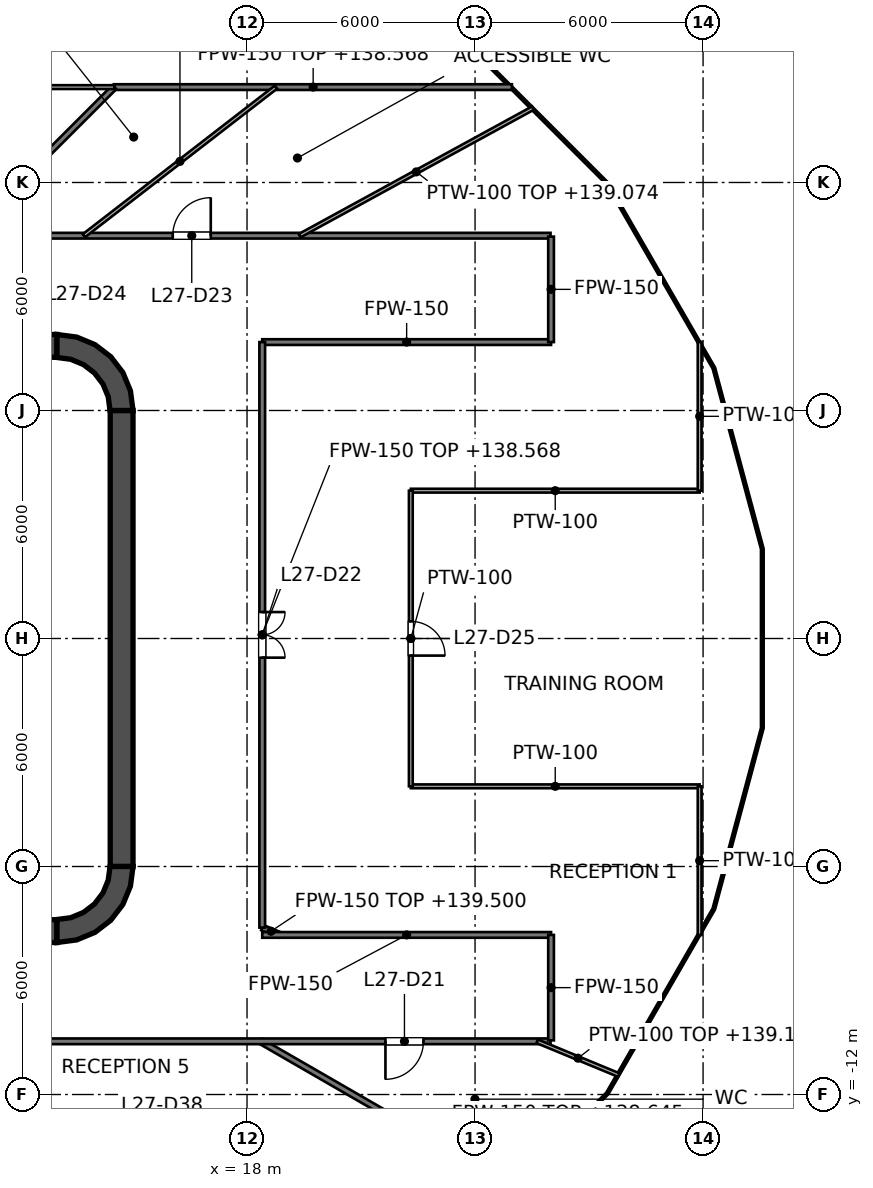
"""IFC4 building model, lengths in metres.
Left out: names, types, materials, properties, quantities, classifications, styles, units other than length and angle.
Written with IfcOpenShell. Run it as: python <this file> out.ifc"""

import sys

from ifc_helpers import new_model, si_unit, direction, frame, frame_2d, origin, place, context, subcontext, project, spatial, polyline, rectangle, outline, extrude, element, fill, save


model = new_model("IFC4")
c1 = context("Model", 3, precision=1e-05, world=origin(), true_north=direction((0.0, 1.0)))
c2 = subcontext(c1, "Body", "Model", "MODEL_VIEW")
j1 = project(units=[si_unit("LENGTHUNIT", "METRE"), si_unit("PLANEANGLEUNIT", "RADIAN")], contexts=[c1])
p1 = place(None, origin())
s1 = spatial("IfcSite", under=j1, at=p1, CompositionType="ELEMENT")
p2 = place(p1, origin())
s2 = spatial("IfcBuilding", under=s1, at=p2, CompositionType="ELEMENT")
p3 = place(p2, frame((0.0, 0.0, 135.6)))
s3 = spatial("IfcBuildingStorey", under=s2, at=p3, CompositionType="ELEMENT", Elevation=135.6)
p4 = place(p3, frame((-13.0, 7.7, 0.0), z_axis=(0.0, 0.0, 1.0), x_axis=(1.0, 0.0, 0.0)))
e1 = element("IfcWall", 1, at=p4, inside=s3, PredefinedType="SHEAR", context=c2, shape_type="SweptSolid", body=[
    extrude(rectangle(XDim=26.0, YDim=0.6, at=frame_2d((13.0, 0.0))), origin(), (0.0, 0.0, 1.0), 4.2),
])
p5 = place(p4, frame((1.7, 0.0, 0.0)))
e2 = element("IfcOpeningElement", 2, at=p5, cuts=e1, PredefinedType="OPENING", context=c2, shape_type="SweptSolid", body=[
    extrude(rectangle(XDim=1.8, YDim=2.1, at=frame_2d((0.9, 1.05))), frame((0.0, 0.3, 0.0), z_axis=(0.0, -1.0, 0.0), x_axis=(1.0, 0.0, 0.0)), (0.0, 0.0, 1.0), 0.6),
])
p6 = place(p4, frame((22.5, 0.0, 0.0)))
e3 = element("IfcOpeningElement", 3, at=p6, cuts=e1, PredefinedType="OPENING", context=c2, shape_type="SweptSolid", body=[
    extrude(rectangle(XDim=1.8, YDim=2.1, at=frame_2d((0.9, 1.05))), frame((0.0, 0.3, 0.0), z_axis=(0.0, -1.0, 0.0), x_axis=(1.0, 0.0, 0.0)), (0.0, 0.0, 1.0), 0.6),
])
p7 = place(p3, frame((-13.0, -7.7, 0.0), z_axis=(0.0, 0.0, 1.0), x_axis=(1.0, 0.0, 0.0)))
e4 = element("IfcWall", 4, at=p7, inside=s3, PredefinedType="SHEAR", context=c2, shape_type="SweptSolid", body=[
    extrude(rectangle(XDim=26.0, YDim=0.6, at=frame_2d((13.0, 0.0))), origin(), (0.0, 0.0, 1.0), 4.2),
])
p8 = place(p7, frame((1.7, 0.0, 0.0)))
e5 = element("IfcOpeningElement", 5, at=p8, cuts=e4, PredefinedType="OPENING", context=c2, shape_type="SweptSolid", body=[
    extrude(rectangle(XDim=1.8, YDim=2.1, at=frame_2d((0.9, 1.05))), frame((0.0, 0.3, 0.0), z_axis=(0.0, -1.0, 0.0), x_axis=(1.0, 0.0, 0.0)), (0.0, 0.0, 1.0), 0.6),
])
p9 = place(p7, frame((22.5, 0.0, 0.0)))
e6 = element("IfcOpeningElement", 6, at=p9, cuts=e4, PredefinedType="OPENING", context=c2, shape_type="SweptSolid", body=[
    extrude(rectangle(XDim=1.8, YDim=2.1, at=frame_2d((0.9, 1.05))), frame((0.0, 0.3, 0.0), z_axis=(0.0, -1.0, 0.0), x_axis=(1.0, 0.0, 0.0)), (0.0, 0.0, 1.0), 0.6),
])
p10 = place(p3, frame((14.7, -6.0, 0.0), z_axis=(0.0, 0.0, 1.0), x_axis=(0.0, 1.0, 0.0)))
e7 = element("IfcWall", 7, at=p10, inside=s3, PredefinedType="SHEAR", context=c2, shape_type="SweptSolid", body=[
    extrude(rectangle(XDim=12.0, YDim=0.6, at=frame_2d((6.0, 0.0))), origin(), (0.0, 0.0, 1.0), 4.2),
])
p11 = place(p3, origin())
e8 = element("IfcWall", 8, at=p11, inside=s3, PredefinedType="SHEAR", context=c2, shape_type="SweptSolid", body=[
    extrude(outline(polyline([(13.0, 8.0), (13.0, 7.395), (13.361, 7.347), (13.698, 7.208), (13.986, 6.986), (14.208, 6.698), (14.347, 6.361), (14.395, 6.0), (15.0, 6.0), (14.932, 6.518), (14.732, 7.0), (14.414, 7.414), (14.0, 7.732), (13.518, 7.932), (13.0, 8.0)])), origin(), (0.0, 0.0, 1.0), 4.2),
])
e9 = element("IfcWall", 9, at=p11, inside=s3, PredefinedType="SHEAR", context=c2, shape_type="SweptSolid", body=[
    extrude(outline(polyline([(15.0, -6.0), (14.395, -6.0), (14.347, -6.361), (14.208, -6.698), (13.986, -6.986), (13.698, -7.208), (13.361, -7.347), (13.0, -7.395), (13.0, -8.0), (13.518, -7.932), (14.0, -7.732), (14.414, -7.414), (14.732, -7.0), (14.932, -6.518), (15.0, -6.0)])), origin(), (0.0, 0.0, 1.0), 4.2),
])
e10 = element("IfcWall", 10, at=p11, inside=s3, PredefinedType="SOLIDWALL", context=c2, shape_type="SweptSolid", body=[
    extrude(outline(polyline([(12.0, -5.675), (12.0, -5.925), (14.15, -5.925), (14.4, -5.925), (14.4, -5.675), (14.4, -3.025), (14.4, -2.775), (14.4, -0.125), (14.4, 0.125), (14.4, 2.775), (14.4, 3.025), (14.4, 5.675), (14.4, 5.925), (14.15, 5.925), (12.0, 5.925), (12.0, 5.675), (14.15, 5.675), (14.15, 3.025), (12.0, 3.025), (12.0, 2.775), (14.15, 2.775), (14.15, 0.125), (12.0, 0.125), (12.0, -0.125), (14.15, -0.125), (14.15, -2.775), (12.0, -2.775), (12.0, -3.025), (14.15, -3.025), (14.15, -5.675), (12.0, -5.675)])), origin(), (0.0, 0.0, 1.0), 4.05),
])
p12 = place(p3, frame((18.359, -10.6, 0.0), z_axis=(0.0, 0.0, 1.0), x_axis=(0.866036201792, -0.499981296836, 0.0)))
e11 = element("IfcWall", 11, at=p12, inside=s3, PredefinedType="PARTITIONING", context=c2, shape_type="SweptSolid", body=[
    extrude(rectangle(XDim=7.702, YDim=0.15, at=frame_2d((3.851, 0.0))), origin(), (0.0, 0.0, 1.0), 3.045),
])
p13 = place(p3, frame((18.4, -7.608, 0.0), z_axis=(0.0, 0.0, 1.0), x_axis=(0.923666464005, -0.383197420755, 0.0)))
e12 = element("IfcWall", 12, at=p13, inside=s3, PredefinedType="PARTITIONING", context=c2, shape_type="SweptSolid", body=[
    extrude(rectangle(XDim=0.501, YDim=0.15, at=frame_2d((0.251, 0.0))), origin(), (0.0, 0.0, 1.0), 3.9),
])
p14 = place(p3, frame((-25.986, -10.6, 0.0), z_axis=(0.0, 0.0, 1.0), x_axis=(1.0, 0.0, 0.0)))
e13 = element("IfcWall", 13, at=p14, inside=s3, PredefinedType="PARTITIONING", context=c2, shape_type="SweptSolid", body=[
    extrude(rectangle(XDim=51.972, YDim=0.15, at=frame_2d((25.986, 0.0))), origin(), (0.0, 0.0, 1.0), 2.968),
])
p15 = place(p14, frame((47.628, 0.0, 0.0)))
e14 = element("IfcOpeningElement", 14, at=p15, cuts=e13, PredefinedType="OPENING", context=c2, shape_type="SweptSolid", body=[
    extrude(rectangle(XDim=1.0, YDim=2.1, at=frame_2d((0.5, 1.05))), frame((0.0, 0.075, 0.0), z_axis=(0.0, -1.0, 0.0), x_axis=(1.0, 0.0, 0.0)), (0.0, 0.0, 1.0), 0.15),
])
p16 = place(p14, frame((5.312, 0.0, 0.0)))
e15 = element("IfcOpeningElement", 15, at=p16, cuts=e13, PredefinedType="OPENING", context=c2, shape_type="SweptSolid", body=[
    extrude(rectangle(XDim=1.0, YDim=2.1, at=frame_2d((0.5, 1.05))), frame((0.0, 0.075, 0.0), z_axis=(0.0, -1.0, 0.0), x_axis=(1.0, 0.0, 0.0)), (0.0, 0.0, 1.0), 0.15),
])
p17 = place(p14, frame((14.924, 0.0, 0.0)))
e16 = element("IfcOpeningElement", 16, at=p17, cuts=e13, PredefinedType="OPENING", context=c2, shape_type="SweptSolid", body=[
    extrude(rectangle(XDim=1.0, YDim=2.1, at=frame_2d((0.5, 1.05))), frame((0.0, 0.075, 0.0), z_axis=(0.0, -1.0, 0.0), x_axis=(1.0, 0.0, 0.0)), (0.0, 0.0, 1.0), 0.15),
])
p18 = place(p14, frame((22.156, 0.0, 0.0)))
e17 = element("IfcOpeningElement", 17, at=p18, cuts=e13, PredefinedType="OPENING", context=c2, shape_type="SweptSolid", body=[
    extrude(rectangle(XDim=1.0, YDim=2.1, at=frame_2d((0.5, 1.05))), frame((0.0, 0.075, 0.0), z_axis=(0.0, -1.0, 0.0), x_axis=(1.0, 0.0, 0.0)), (0.0, 0.0, 1.0), 0.15),
])
p19 = place(p14, frame((27.795, 0.0, 0.0)))
e18 = element("IfcOpeningElement", 18, at=p19, cuts=e13, PredefinedType="OPENING", context=c2, shape_type="SweptSolid", body=[
    extrude(rectangle(XDim=1.0, YDim=2.1, at=frame_2d((0.5, 1.05))), frame((0.0, 0.075, 0.0), z_axis=(0.0, -1.0, 0.0), x_axis=(1.0, 0.0, 0.0)), (0.0, 0.0, 1.0), 0.15),
])
p20 = place(p14, frame((37.045, 0.0, 0.0)))
e19 = element("IfcOpeningElement", 19, at=p20, cuts=e13, PredefinedType="OPENING", context=c2, shape_type="SweptSolid", body=[
    extrude(rectangle(XDim=1.0, YDim=2.1, at=frame_2d((0.5, 1.05))), frame((0.0, 0.075, 0.0), z_axis=(0.0, -1.0, 0.0), x_axis=(1.0, 0.0, 0.0)), (0.0, 0.0, 1.0), 0.15),
])
for number, where, z_axis, x_axis in (
    (20, (18.4, -7.8, 0.0), (0.0, 0.0, 1.0), (1.0, 0.0, 0.0)),
    (21, (18.4, 7.8, 0.0), (0.0, 0.0, 1.0), (1.0, 0.0, 0.0)),
):
    element("IfcWall", number, at=place(p3, frame(where, z_axis=z_axis, x_axis=x_axis)), inside=s3, PredefinedType="PARTITIONING", context=c2, shape_type="SweptSolid", body=[
        extrude(rectangle(XDim=7.6, YDim=0.15, at=frame_2d((3.8, 0.0))), origin(), (0.0, 0.0, 1.0), 2.977),
    ])
p21 = place(p3, frame((-25.986, 10.6, 0.0), z_axis=(0.0, 0.0, 1.0), x_axis=(1.0, 0.0, 0.0)))
e22 = element("IfcWall", 22, at=p21, inside=s3, PredefinedType="PARTITIONING", context=c2, shape_type="SweptSolid", body=[
    extrude(rectangle(XDim=51.972, YDim=0.15, at=frame_2d((25.986, 0.0))), origin(), (0.0, 0.0, 1.0), 2.968),
])
p22 = place(p21, frame((42.031, 0.0, 0.0)))
e23 = element("IfcOpeningElement", 23, at=p22, cuts=e22, PredefinedType="OPENING", context=c2, shape_type="SweptSolid", body=[
    extrude(rectangle(XDim=1.0, YDim=2.1, at=frame_2d((0.5, 1.05))), frame((0.0, 0.075, 0.0), z_axis=(0.0, -1.0, 0.0), x_axis=(1.0, 0.0, 0.0)), (0.0, 0.0, 1.0), 0.15),
])
p23 = place(p21, frame((37.69, 0.0, 0.0)))
e24 = element("IfcOpeningElement", 24, at=p23, cuts=e22, PredefinedType="OPENING", context=c2, shape_type="SweptSolid", body=[
    extrude(rectangle(XDim=1.0, YDim=2.1, at=frame_2d((0.5, 1.05))), frame((0.0, 0.075, 0.0), z_axis=(0.0, -1.0, 0.0), x_axis=(1.0, 0.0, 0.0)), (0.0, 0.0, 1.0), 0.15),
])
p24 = place(p21, frame((32.156, 0.0, 0.0)))
e25 = element("IfcOpeningElement", 25, at=p24, cuts=e22, PredefinedType="OPENING", context=c2, shape_type="SweptSolid", body=[
    extrude(rectangle(XDim=1.0, YDim=2.1, at=frame_2d((0.5, 1.05))), frame((0.0, 0.075, 0.0), z_axis=(0.0, -1.0, 0.0), x_axis=(1.0, 0.0, 0.0)), (0.0, 0.0, 1.0), 0.15),
])
p25 = place(p21, frame((23.896, 0.0, 0.0)))
e26 = element("IfcOpeningElement", 26, at=p25, cuts=e22, PredefinedType="OPENING", context=c2, shape_type="SweptSolid", body=[
    extrude(rectangle(XDim=1.0, YDim=2.1, at=frame_2d((0.5, 1.05))), frame((0.0, 0.075, 0.0), z_axis=(0.0, -1.0, 0.0), x_axis=(1.0, 0.0, 0.0)), (0.0, 0.0, 1.0), 0.15),
])
p26 = place(p21, frame((13.126, 0.0, 0.0)))
e27 = element("IfcOpeningElement", 27, at=p26, cuts=e22, PredefinedType="OPENING", context=c2, shape_type="SweptSolid", body=[
    extrude(rectangle(XDim=1.2, YDim=2.1, at=frame_2d((0.6, 1.05))), frame((0.0, 0.075, 0.0), z_axis=(0.0, -1.0, 0.0), x_axis=(1.0, 0.0, 0.0)), (0.0, 0.0, 1.0), 0.15),
])
p27 = place(p3, frame((14.51, 14.51, 0.0), z_axis=(0.0, 0.0, 1.0), x_axis=(1.0, 0.0, 0.0)))
e28 = element("IfcWall", 28, at=p27, inside=s3, PredefinedType="PARTITIONING", context=c2, shape_type="SweptSolid", body=[
    extrude(rectangle(XDim=10.46, YDim=0.15, at=frame_2d((5.23, 0.0))), origin(), (0.0, 0.0, 1.0), 2.968),
])
p28 = place(p3, frame((10.6, 10.6, 0.0), z_axis=(0.0, 0.0, 1.0), x_axis=(0.707106781187, 0.707106781187, 0.0)))
e29 = element("IfcWall", 29, at=p28, inside=s3, PredefinedType="PARTITIONING", context=c2, shape_type="SweptSolid", body=[
    extrude(rectangle(XDim=5.53, YDim=0.15, at=frame_2d((2.765, 0.0))), origin(), (0.0, 0.0, 1.0), 2.968),
])
for number, where, z_axis, x_axis in (
    (30, (26.0, -10.575, 0.0), (0.0, 0.0, 1.0), (0.0, 1.0, 0.0)),
    (31, (26.0, 7.8, 0.0), (0.0, 0.0, 1.0), (0.0, 1.0, 0.0)),
):
    element("IfcWall", number, at=place(p3, frame(where, z_axis=z_axis, x_axis=x_axis)), inside=s3, PredefinedType="PARTITIONING", context=c2, shape_type="SweptSolid", body=[
        extrude(rectangle(XDim=2.775, YDim=0.15, at=frame_2d((1.387, 0.0))), origin(), (0.0, 0.0, 1.0), 2.977),
    ])
p29 = place(p3, frame((18.4, -7.608, 0.0), z_axis=(0.0, 0.0, 1.0), x_axis=(0.0, 1.0, 0.0)))
e32 = element("IfcWall", 32, at=p29, inside=s3, PredefinedType="PARTITIONING", context=c2, shape_type="SweptSolid", body=[
    extrude(rectangle(XDim=15.408, YDim=0.15, at=frame_2d((7.704, 0.0))), origin(), (0.0, 0.0, 1.0), 2.968),
])
p30 = place(p29, frame((7.104, 0.0, 0.0)))
e33 = element("IfcOpeningElement", 33, at=p30, cuts=e32, PredefinedType="OPENING", context=c2, shape_type="SweptSolid", body=[
    extrude(rectangle(XDim=1.2, YDim=2.1, at=frame_2d((0.6, 1.05))), frame((0.0, 0.075, 0.0), z_axis=(0.0, -1.0, 0.0), x_axis=(1.0, 0.0, 0.0)), (0.0, 0.0, 1.0), 0.15),
])
p31 = place(p3, frame((25.635, -10.6, 0.0), z_axis=(0.0, 0.0, 1.0), x_axis=(0.924087226733, -0.382181628796, 0.0)))
e34 = element("IfcWall", 34, at=p31, inside=s3, PredefinedType="PARTITIONING", context=c2, shape_type="SweptSolid", body=[
    extrude(rectangle(XDim=2.323, YDim=0.1, at=frame_2d((1.162, 0.0))), origin(), (0.0, 0.0, 1.0), 3.525),
])
for number, where, z_axis, x_axis in (
    (35, (22.31, -3.89, 0.0), (0.0, 0.0, 1.0), (1.0, 0.0, 0.0)),
    (36, (22.31, 3.89, 0.0), (0.0, 0.0, 1.0), (1.0, 0.0, 0.0)),
):
    element("IfcWall", number, at=place(p3, frame(where, z_axis=z_axis, x_axis=x_axis)), inside=s3, PredefinedType="PARTITIONING", context=c2, shape_type="SweptSolid", body=[
        extrude(rectangle(XDim=7.6, YDim=0.1, at=frame_2d((3.8, 0.0))), origin(), (0.0, 0.0, 1.0), 2.968),
    ])
p32 = place(p3, frame((-8.378, 14.51, 0.0), z_axis=(0.0, 0.0, 1.0), x_axis=(1.0, 0.0, 0.0)))
e37 = element("IfcWall", 37, at=p32, inside=s3, PredefinedType="PARTITIONING", context=c2, shape_type="SweptSolid", body=[
    extrude(rectangle(XDim=22.888, YDim=0.1, at=frame_2d((11.444, 0.0))), origin(), (0.0, 0.0, 1.0), 2.968),
])
p33 = place(p32, frame((5.233, 0.0, 0.0)))
e38 = element("IfcOpeningElement", 38, at=p33, cuts=e37, PredefinedType="OPENING", context=c2, shape_type="SweptSolid", body=[
    extrude(rectangle(XDim=1.8, YDim=2.1, at=frame_2d((0.9, 1.05))), frame((0.0, 0.05, 0.0), z_axis=(0.0, -1.0, 0.0), x_axis=(1.0, 0.0, 0.0)), (0.0, 0.0, 1.0), 0.1),
])
p34 = place(p3, frame((19.384, 10.6, 0.0), z_axis=(0.0, 0.0, 1.0), x_axis=(0.877388352769, 0.479780865006, 0.0)))
e39 = element("IfcWall", 39, at=p34, inside=s3, PredefinedType="PARTITIONING", context=c2, shape_type="SweptSolid", body=[
    extrude(rectangle(XDim=6.997, YDim=0.1, at=frame_2d((3.499, 0.0))), origin(), (0.0, 0.0, 1.0), 3.473),
])
p35 = place(p3, frame((13.707, 10.6, 0.0), z_axis=(0.0, 0.0, 1.0), x_axis=(0.791052244704, 0.611748597177, 0.0)))
e40 = element("IfcWall", 40, at=p35, inside=s3, PredefinedType="PARTITIONING", context=c2, shape_type="SweptSolid", body=[
    extrude(rectangle(XDim=6.391, YDim=0.1, at=frame_2d((3.196, 0.0))), origin(), (0.0, 0.0, 1.0), 3.9),
])
for number, where, z_axis, x_axis in (
    (41, (29.91, -7.803, 0.0), (0.0, 0.0, 1.0), (0.0, 1.0, 0.0)),
    (42, (29.91, 3.89, 0.0), (0.0, 0.0, 1.0), (0.0, 1.0, 0.0)),
):
    element("IfcWall", number, at=place(p3, frame(where, z_axis=z_axis, x_axis=x_axis)), inside=s3, PredefinedType="PARTITIONING", context=c2, shape_type="SweptSolid", body=[
        extrude(rectangle(XDim=3.913, YDim=0.1, at=frame_2d((1.957, 0.0))), origin(), (0.0, 0.0, 1.0), 2.968),
    ])
p36 = place(p3, frame((22.31, -3.89, 0.0), z_axis=(0.0, 0.0, 1.0), x_axis=(0.0, 1.0, 0.0)))
e43 = element("IfcWall", 43, at=p36, inside=s3, PredefinedType="PARTITIONING", context=c2, shape_type="SweptSolid", body=[
    extrude(rectangle(XDim=7.78, YDim=0.1, at=frame_2d((3.89, 0.0))), origin(), (0.0, 0.0, 1.0), 2.968),
])
p37 = place(p36, frame((3.44, 0.0, 0.0)))
e44 = element("IfcOpeningElement", 44, at=p37, cuts=e43, PredefinedType="OPENING", context=c2, shape_type="SweptSolid", body=[
    extrude(rectangle(XDim=0.9, YDim=2.1, at=frame_2d((0.45, 1.05))), frame((0.0, 0.05, 0.0), z_axis=(0.0, -1.0, 0.0), x_axis=(1.0, 0.0, 0.0)), (0.0, 0.0, 1.0), 0.1),
])
p38 = place(p15, origin())
e45 = element("IfcDoor", 45, at=p38, inside=s3, OperationType="SINGLE_SWING_LEFT", PredefinedType="DOOR", context=c2, shape_type="SweptSolid", body=[
    extrude(rectangle(XDim=1.0, YDim=2.1, at=frame_2d((0.5, 1.05))), frame((0.0, 0.025, 0.0), z_axis=(0.0, -1.0, 0.0), x_axis=(1.0, 0.0, 0.0)), (0.0, 0.0, 1.0), 0.05),
])
fill(e14, e45)
p39 = place(p30, origin())
e46 = element("IfcDoor", 46, at=p39, inside=s3, OperationType="DOUBLE_DOOR_SINGLE_SWING", PredefinedType="DOOR", context=c2, shape_type="SweptSolid", body=[
    extrude(rectangle(XDim=1.2, YDim=2.1, at=frame_2d((0.6, 1.05))), frame((0.0, 0.025, 0.0), z_axis=(0.0, -1.0, 0.0), x_axis=(1.0, 0.0, 0.0)), (0.0, 0.0, 1.0), 0.05),
])
fill(e33, e46)
p40 = place(p22, origin())
e47 = element("IfcDoor", 47, at=p40, inside=s3, OperationType="SINGLE_SWING_RIGHT", PredefinedType="DOOR", context=c2, shape_type="SweptSolid", body=[
    extrude(rectangle(XDim=1.0, YDim=2.1, at=frame_2d((0.5, 1.05))), frame((0.0, 0.025, 0.0), z_axis=(0.0, -1.0, 0.0), x_axis=(1.0, 0.0, 0.0)), (0.0, 0.0, 1.0), 0.05),
])
fill(e23, e47)
p41 = place(p37, origin())
e48 = element("IfcDoor", 48, at=p41, inside=s3, OperationType="SINGLE_SWING_LEFT", PredefinedType="DOOR", context=c2, shape_type="SweptSolid", body=[
    extrude(rectangle(XDim=0.9, YDim=2.1, at=frame_2d((0.45, 1.05))), frame((0.0, 0.025, 0.0), z_axis=(0.0, -1.0, 0.0), x_axis=(1.0, 0.0, 0.0)), (0.0, 0.0, 1.0), 0.05),
])
fill(e44, e48)
save(model, sys.argv[1])
